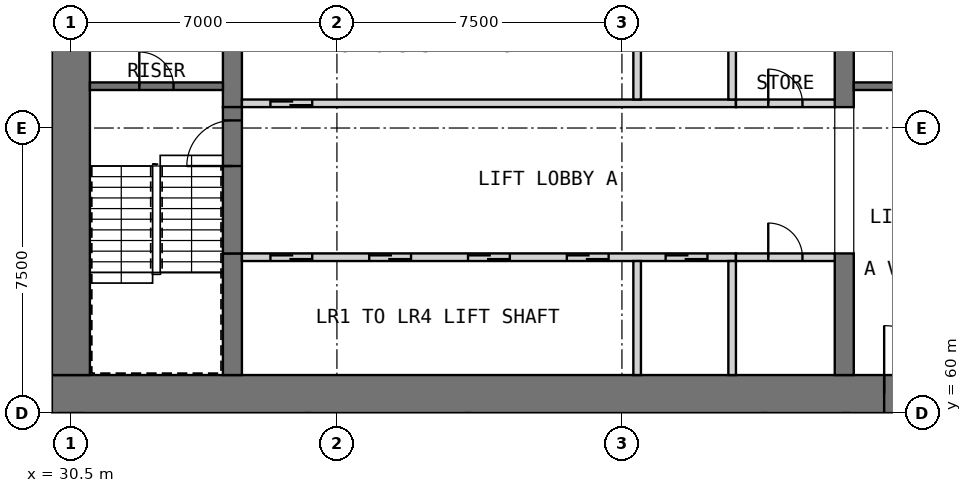
"""IFC4 building model, lengths in metres.
Left out: names, types, materials, properties, quantities, classifications, styles, units other than length and angle.
Written with IfcOpenShell. Run it as: python <this file> out.ifc"""

import sys

from ifc_helpers import new_model, si_unit, direction, frame, frame_2d, origin, place, context, subcontext, project, spatial, rectangle, extrude, element, fill, save


model = new_model("IFC4")
c1 = context("Model", 3, precision=1e-05, world=origin(), true_north=direction((0.0, 1.0)))
c2 = subcontext(c1, "Body", "Model", "MODEL_VIEW")
j1 = project(units=[si_unit("LENGTHUNIT", "METRE"), si_unit("PLANEANGLEUNIT", "RADIAN")], contexts=[c1])
p1 = place(None, origin())
s1 = spatial("IfcSite", under=j1, at=p1, CompositionType="ELEMENT")
p2 = place(p1, origin())
s2 = spatial("IfcBuilding", under=s1, at=p2, CompositionType="ELEMENT")
p3 = place(p2, frame((0.0, 0.0, 89.9)))
s3 = spatial("IfcBuildingStorey", under=s2, at=p3, CompositionType="ELEMENT", Elevation=89.9)
p4 = place(p3, frame((30.0, 60.5, 0.0), z_axis=(0.0, 0.0, 1.0), x_axis=(1.0, 0.0, 0.0)))
e1 = element("IfcWall", 1, at=p4, inside=s3, PredefinedType="SHEAR", context=c2, shape_type="SweptSolid", body=[
    extrude(rectangle(XDim=30.0, YDim=1.0, at=frame_2d((15.0, 0.0))), origin(), (0.0, 0.0, 1.0), 3.6),
])
p5 = place(p4, frame((21.9, 0.0, 0.0)))
e2 = element("IfcOpeningElement", 2, at=p5, cuts=e1, PredefinedType="OPENING", context=c2, shape_type="SweptSolid", body=[
    extrude(rectangle(XDim=1.8, YDim=2.1, at=frame_2d((0.9, 1.05))), frame((0.0, 0.51, 0.0), z_axis=(0.0, -1.0, 0.0), x_axis=(1.0, 0.0, 0.0)), (0.0, 0.0, 1.0), 1.02),
])
p6 = place(p4, frame((26.5, 0.0, 0.0)))
e3 = element("IfcOpeningElement", 3, at=p6, cuts=e1, PredefinedType="OPENING", context=c2, shape_type="SweptSolid", body=[
    extrude(rectangle(XDim=1.2, YDim=2.1, at=frame_2d((0.6, 1.05))), frame((0.0, 0.51, 0.0), z_axis=(0.0, -1.0, 0.0), x_axis=(1.0, 0.0, 0.0)), (0.0, 0.0, 1.0), 1.02),
])
p7 = place(p3, frame((30.5, 61.0, 0.0), z_axis=(0.0, 0.0, 1.0), x_axis=(0.0, 1.0, 0.0)))
e4 = element("IfcWall", 4, at=p7, inside=s3, PredefinedType="SHEAR", context=c2, shape_type="SweptSolid", body=[
    extrude(rectangle(XDim=20.5, YDim=1.0, at=frame_2d((10.25, 0.0))), origin(), (0.0, 0.0, 1.0), 3.6),
])
p8 = place(p3, frame((34.75, 61.0, 0.0), z_axis=(0.0, 0.0, 1.0), x_axis=(0.0, 1.0, 0.0)))
e5 = element("IfcWall", 5, at=p8, inside=s3, PredefinedType="SHEAR", context=c2, shape_type="SweptSolid", body=[
    extrude(rectangle(XDim=3.2, YDim=0.5, at=frame_2d((1.6, 0.0))), origin(), (0.0, 0.0, 1.0), 3.6),
])
p9 = place(p3, frame((34.75, 68.05, 0.0), z_axis=(0.0, 0.0, 1.0), x_axis=(0.0, 1.0, 0.0)))
e6 = element("IfcWall", 6, at=p9, inside=s3, PredefinedType="SHEAR", context=c2, shape_type="SweptSolid", body=[
    extrude(rectangle(XDim=6.4, YDim=0.5, at=frame_2d((3.2, 0.0))), origin(), (0.0, 0.0, 1.0), 3.6),
])
p10 = place(p3, frame((50.85, 61.0, 0.0), z_axis=(0.0, 0.0, 1.0), x_axis=(0.0, 1.0, 0.0)))
e7 = element("IfcWall", 7, at=p10, inside=s3, PredefinedType="SHEAR", context=c2, shape_type="SweptSolid", body=[
    extrude(rectangle(XDim=3.2, YDim=0.5, at=frame_2d((1.6, 0.0))), origin(), (0.0, 0.0, 1.0), 3.6),
])
p11 = place(p3, frame((50.85, 68.05, 0.0), z_axis=(0.0, 0.0, 1.0), x_axis=(0.0, 1.0, 0.0)))
e8 = element("IfcWall", 8, at=p11, inside=s3, PredefinedType="SHEAR", context=c2, shape_type="SweptSolid", body=[
    extrude(rectangle(XDim=6.4, YDim=0.5, at=frame_2d((3.2, 0.0))), origin(), (0.0, 0.0, 1.0), 3.6),
])
p12 = place(p3, frame((35.0, 64.1, 0.0), z_axis=(0.0, 0.0, 1.0), x_axis=(1.0, 0.0, 0.0)))
e9 = element("IfcWall", 9, at=p12, inside=s3, PredefinedType="SOLIDWALL", context=c2, shape_type="SweptSolid", body=[
    extrude(rectangle(XDim=13.0, YDim=0.2, at=frame_2d((6.5, 0.0))), origin(), (0.0, 0.0, 1.0), 3.6),
])
p13 = place(p12, frame((0.75, 0.0, 0.0)))
e10 = element("IfcOpeningElement", 10, at=p13, cuts=e9, PredefinedType="OPENING", context=c2, shape_type="SweptSolid", body=[
    extrude(rectangle(XDim=1.1, YDim=2.1, at=frame_2d((0.55, 1.05))), frame((0.0, 0.11, 0.0), z_axis=(0.0, -1.0, 0.0), x_axis=(1.0, 0.0, 0.0)), (0.0, 0.0, 1.0), 0.22),
])
p14 = place(p12, frame((3.35, 0.0, 0.0)))
e11 = element("IfcOpeningElement", 11, at=p14, cuts=e9, PredefinedType="OPENING", context=c2, shape_type="SweptSolid", body=[
    extrude(rectangle(XDim=1.1, YDim=2.1, at=frame_2d((0.55, 1.05))), frame((0.0, 0.11, 0.0), z_axis=(0.0, -1.0, 0.0), x_axis=(1.0, 0.0, 0.0)), (0.0, 0.0, 1.0), 0.22),
])
p15 = place(p12, frame((5.95, 0.0, 0.0)))
e12 = element("IfcOpeningElement", 12, at=p15, cuts=e9, PredefinedType="OPENING", context=c2, shape_type="SweptSolid", body=[
    extrude(rectangle(XDim=1.1, YDim=2.1, at=frame_2d((0.55, 1.05))), frame((0.0, 0.11, 0.0), z_axis=(0.0, -1.0, 0.0), x_axis=(1.0, 0.0, 0.0)), (0.0, 0.0, 1.0), 0.22),
])
p16 = place(p12, frame((8.55, 0.0, 0.0)))
e13 = element("IfcOpeningElement", 13, at=p16, cuts=e9, PredefinedType="OPENING", context=c2, shape_type="SweptSolid", body=[
    extrude(rectangle(XDim=1.1, YDim=2.1, at=frame_2d((0.55, 1.05))), frame((0.0, 0.11, 0.0), z_axis=(0.0, -1.0, 0.0), x_axis=(1.0, 0.0, 0.0)), (0.0, 0.0, 1.0), 0.22),
])
p17 = place(p12, frame((11.15, 0.0, 0.0)))
e14 = element("IfcOpeningElement", 14, at=p17, cuts=e9, PredefinedType="OPENING", context=c2, shape_type="SweptSolid", body=[
    extrude(rectangle(XDim=1.1, YDim=2.1, at=frame_2d((0.55, 1.05))), frame((0.0, 0.11, 0.0), z_axis=(0.0, -1.0, 0.0), x_axis=(1.0, 0.0, 0.0)), (0.0, 0.0, 1.0), 0.22),
])
for number, where, z_axis, x_axis in (
    (15, (45.4, 61.0, 0.0), (0.0, 0.0, 1.0), (0.0, 1.0, 0.0)),
    (16, (47.9, 61.0, 0.0), (0.0, 0.0, 1.0), (0.0, 1.0, 0.0)),
):
    element("IfcWall", number, at=place(p3, frame(where, z_axis=z_axis, x_axis=x_axis)), inside=s3, PredefinedType="SOLIDWALL", context=c2, shape_type="SweptSolid", body=[
        extrude(rectangle(XDim=3.0, YDim=0.2, at=frame_2d((1.5, 0.0))), origin(), (0.0, 0.0, 1.0), 3.6),
    ])
p18 = place(p3, frame((48.0, 64.1, 0.0), z_axis=(0.0, 0.0, 1.0), x_axis=(1.0, 0.0, 0.0)))
e17 = element("IfcWall", 17, at=p18, inside=s3, PredefinedType="PARTITIONING", context=c2, shape_type="SweptSolid", body=[
    extrude(rectangle(XDim=2.6, YDim=0.2, at=frame_2d((1.3, 0.0))), origin(), (0.0, 0.0, 1.0), 3.35),
])
p19 = place(p18, frame((0.85, 0.0, 0.0)))
e18 = element("IfcOpeningElement", 18, at=p19, cuts=e17, PredefinedType="OPENING", context=c2, shape_type="SweptSolid", body=[
    extrude(rectangle(XDim=0.9, YDim=2.1, at=frame_2d((0.45, 1.05))), frame((0.0, 0.11, 0.0), z_axis=(0.0, -1.0, 0.0), x_axis=(1.0, 0.0, 0.0)), (0.0, 0.0, 1.0), 0.22),
])
p20 = place(p3, frame((35.0, 68.15, 0.0), z_axis=(0.0, 0.0, 1.0), x_axis=(1.0, 0.0, 0.0)))
e19 = element("IfcWall", 19, at=p20, inside=s3, PredefinedType="SOLIDWALL", context=c2, shape_type="SweptSolid", body=[
    extrude(rectangle(XDim=13.0, YDim=0.2, at=frame_2d((6.5, 0.0))), origin(), (0.0, 0.0, 1.0), 3.6),
])
p21 = place(p20, frame((0.75, 0.0, 0.0)))
e20 = element("IfcOpeningElement", 20, at=p21, cuts=e19, PredefinedType="OPENING", context=c2, shape_type="SweptSolid", body=[
    extrude(rectangle(XDim=1.1, YDim=2.1, at=frame_2d((0.55, 1.05))), frame((0.0, 0.11, 0.0), z_axis=(0.0, -1.0, 0.0), x_axis=(1.0, 0.0, 0.0)), (0.0, 0.0, 1.0), 0.22),
])
for number, where, z_axis, x_axis in (
    (21, (45.4, 68.25, 0.0), (0.0, 0.0, 1.0), (0.0, 1.0, 0.0)),
    (22, (47.9, 68.25, 0.0), (0.0, 0.0, 1.0), (0.0, 1.0, 0.0)),
):
    element("IfcWall", number, at=place(p3, frame(where, z_axis=z_axis, x_axis=x_axis)), inside=s3, PredefinedType="SOLIDWALL", context=c2, shape_type="SweptSolid", body=[
        extrude(rectangle(XDim=2.75, YDim=0.2, at=frame_2d((1.375, 0.0))), origin(), (0.0, 0.0, 1.0), 3.6),
    ])
p22 = place(p3, frame((48.0, 68.15, 0.0), z_axis=(0.0, 0.0, 1.0), x_axis=(1.0, 0.0, 0.0)))
e23 = element("IfcWall", 23, at=p22, inside=s3, PredefinedType="PARTITIONING", context=c2, shape_type="SweptSolid", body=[
    extrude(rectangle(XDim=2.6, YDim=0.2, at=frame_2d((1.3, 0.0))), origin(), (0.0, 0.0, 1.0), 3.35),
])
p23 = place(p22, frame((0.85, 0.0, 0.0)))
e24 = element("IfcOpeningElement", 24, at=p23, cuts=e23, PredefinedType="OPENING", context=c2, shape_type="SweptSolid", body=[
    extrude(rectangle(XDim=0.9, YDim=2.1, at=frame_2d((0.45, 1.05))), frame((0.0, 0.11, 0.0), z_axis=(0.0, -1.0, 0.0), x_axis=(1.0, 0.0, 0.0)), (0.0, 0.0, 1.0), 0.22),
])
p24 = place(p3, frame((34.75, 64.2, 0.0), z_axis=(0.0, 0.0, 1.0), x_axis=(0.0, 1.0, 0.0)))
e25 = element("IfcWall", 25, at=p24, inside=s3, PredefinedType="SOLIDWALL", context=c2, shape_type="SweptSolid", body=[
    extrude(rectangle(XDim=3.85, YDim=0.5, at=frame_2d((1.925, 0.0))), origin(), (0.0, 0.0, 1.0), 2.4),
])
p25 = place(p24, frame((2.3, 0.0, 0.0)))
e26 = element("IfcOpeningElement", 26, at=p25, cuts=e25, PredefinedType="OPENING", context=c2, shape_type="SweptSolid", body=[
    extrude(rectangle(XDim=1.2, YDim=2.1, at=frame_2d((0.6, 1.05))), frame((0.0, 0.26, 0.0), z_axis=(0.0, -1.0, 0.0), x_axis=(1.0, 0.0, 0.0)), (0.0, 0.0, 1.0), 0.52),
])
p26 = place(p3, frame((31.0, 68.6, 0.0), z_axis=(0.0, 0.0, 1.0), x_axis=(1.0, 0.0, 0.0)))
e27 = element("IfcWall", 27, at=p26, inside=s3, PredefinedType="SOLIDWALL", context=c2, shape_type="SweptSolid", body=[
    extrude(rectangle(XDim=3.5, YDim=0.2, at=frame_2d((1.75, 0.0))), origin(), (0.0, 0.0, 1.0), 3.35),
])
p27 = place(p26, frame((1.3, 0.0, 0.0)))
e28 = element("IfcOpeningElement", 28, at=p27, cuts=e27, PredefinedType="OPENING", context=c2, shape_type="SweptSolid", body=[
    extrude(rectangle(XDim=0.9, YDim=2.1, at=frame_2d((0.45, 1.05))), frame((0.0, 0.11, 0.0), z_axis=(0.0, -1.0, 0.0), x_axis=(1.0, 0.0, 0.0)), (0.0, 0.0, 1.0), 0.22),
])
p28 = place(p3, frame((51.1, 68.6, 0.0), z_axis=(0.0, 0.0, 1.0), x_axis=(1.0, 0.0, 0.0)))
e29 = element("IfcWall", 29, at=p28, inside=s3, PredefinedType="SOLIDWALL", context=c2, shape_type="SweptSolid", body=[
    extrude(rectangle(XDim=7.9, YDim=0.2, at=frame_2d((3.95, 0.0))), origin(), (0.0, 0.0, 1.0), 3.35),
])
p29 = place(p13, origin())
e30 = element("IfcDoor", 30, at=p29, inside=s3, OperationType="DOUBLE_DOOR_SLIDING", PredefinedType="DOOR", context=c2, shape_type="SweptSolid", body=[
    extrude(rectangle(XDim=1.1, YDim=2.1, at=frame_2d((0.55, 1.05))), frame((0.0, 0.025, 0.0), z_axis=(0.0, -1.0, 0.0), x_axis=(1.0, 0.0, 0.0)), (0.0, 0.0, 1.0), 0.05),
])
fill(e10, e30)
p30 = place(p14, origin())
e31 = element("IfcDoor", 31, at=p30, inside=s3, OperationType="DOUBLE_DOOR_SLIDING", PredefinedType="DOOR", context=c2, shape_type="SweptSolid", body=[
    extrude(rectangle(XDim=1.1, YDim=2.1, at=frame_2d((0.55, 1.05))), frame((0.0, 0.025, 0.0), z_axis=(0.0, -1.0, 0.0), x_axis=(1.0, 0.0, 0.0)), (0.0, 0.0, 1.0), 0.05),
])
fill(e11, e31)
p31 = place(p15, origin())
e32 = element("IfcDoor", 32, at=p31, inside=s3, OperationType="DOUBLE_DOOR_SLIDING", PredefinedType="DOOR", context=c2, shape_type="SweptSolid", body=[
    extrude(rectangle(XDim=1.1, YDim=2.1, at=frame_2d((0.55, 1.05))), frame((0.0, 0.025, 0.0), z_axis=(0.0, -1.0, 0.0), x_axis=(1.0, 0.0, 0.0)), (0.0, 0.0, 1.0), 0.05),
])
fill(e12, e32)
p32 = place(p16, origin())
e33 = element("IfcDoor", 33, at=p32, inside=s3, OperationType="DOUBLE_DOOR_SLIDING", PredefinedType="DOOR", context=c2, shape_type="SweptSolid", body=[
    extrude(rectangle(XDim=1.1, YDim=2.1, at=frame_2d((0.55, 1.05))), frame((0.0, 0.025, 0.0), z_axis=(0.0, -1.0, 0.0), x_axis=(1.0, 0.0, 0.0)), (0.0, 0.0, 1.0), 0.05),
])
fill(e13, e33)
p33 = place(p17, origin())
e34 = element("IfcDoor", 34, at=p33, inside=s3, OperationType="DOUBLE_DOOR_SLIDING", PredefinedType="DOOR", context=c2, shape_type="SweptSolid", body=[
    extrude(rectangle(XDim=1.1, YDim=2.1, at=frame_2d((0.55, 1.05))), frame((0.0, 0.025, 0.0), z_axis=(0.0, -1.0, 0.0), x_axis=(1.0, 0.0, 0.0)), (0.0, 0.0, 1.0), 0.05),
])
fill(e14, e34)
p34 = place(p19, origin())
e35 = element("IfcDoor", 35, at=p34, inside=s3, OperationType="SINGLE_SWING_LEFT", PredefinedType="DOOR", context=c2, shape_type="SweptSolid", body=[
    extrude(rectangle(XDim=0.9, YDim=2.1, at=frame_2d((0.45, 1.05))), frame((0.0, 0.025, 0.0), z_axis=(0.0, -1.0, 0.0), x_axis=(1.0, 0.0, 0.0)), (0.0, 0.0, 1.0), 0.05),
])
fill(e18, e35)
p35 = place(p21, origin())
e36 = element("IfcDoor", 36, at=p35, inside=s3, OperationType="DOUBLE_DOOR_SLIDING", PredefinedType="DOOR", context=c2, shape_type="SweptSolid", body=[
    extrude(rectangle(XDim=1.1, YDim=2.1, at=frame_2d((0.55, 1.05))), frame((0.0, 0.025, 0.0), z_axis=(0.0, -1.0, 0.0), x_axis=(1.0, 0.0, 0.0)), (0.0, 0.0, 1.0), 0.05),
])
fill(e20, e36)
p36 = place(p23, origin())
e37 = element("IfcDoor", 37, at=p36, inside=s3, OperationType="SINGLE_SWING_LEFT", PredefinedType="DOOR", context=c2, shape_type="SweptSolid", body=[
    extrude(rectangle(XDim=0.9, YDim=2.1, at=frame_2d((0.45, 1.05))), frame((0.0, 0.025, 0.0), z_axis=(0.0, -1.0, 0.0), x_axis=(1.0, 0.0, 0.0)), (0.0, 0.0, 1.0), 0.05),
])
fill(e24, e37)
p37 = place(p5, origin())
e38 = element("IfcDoor", 38, at=p37, inside=s3, OperationType="DOUBLE_DOOR_SINGLE_SWING", PredefinedType="DOOR", context=c2, shape_type="SweptSolid", body=[
    extrude(rectangle(XDim=1.8, YDim=2.1, at=frame_2d((0.9, 1.05))), frame((0.0, 0.025, 0.0), z_axis=(0.0, -1.0, 0.0), x_axis=(1.0, 0.0, 0.0)), (0.0, 0.0, 1.0), 0.05),
])
fill(e2, e38)
p38 = place(p25, origin())
e39 = element("IfcDoor", 39, at=p38, inside=s3, OperationType="SINGLE_SWING_LEFT", PredefinedType="DOOR", context=c2, shape_type="SweptSolid", body=[
    extrude(rectangle(XDim=1.2, YDim=2.1, at=frame_2d((0.6, 1.05))), frame((0.0, 0.025, 0.0), z_axis=(0.0, -1.0, 0.0), x_axis=(1.0, 0.0, 0.0)), (0.0, 0.0, 1.0), 0.05),
])
fill(e26, e39)
p39 = place(p27, origin())
e40 = element("IfcDoor", 40, at=p39, inside=s3, OperationType="SINGLE_SWING_LEFT", PredefinedType="DOOR", context=c2, shape_type="SweptSolid", body=[
    extrude(rectangle(XDim=0.9, YDim=2.1, at=frame_2d((0.45, 1.05))), frame((0.0, 0.025, 0.0), z_axis=(0.0, -1.0, 0.0), x_axis=(1.0, 0.0, 0.0)), (0.0, 0.0, 1.0), 0.05),
])
fill(e28, e40)
save(model, sys.argv[1])
